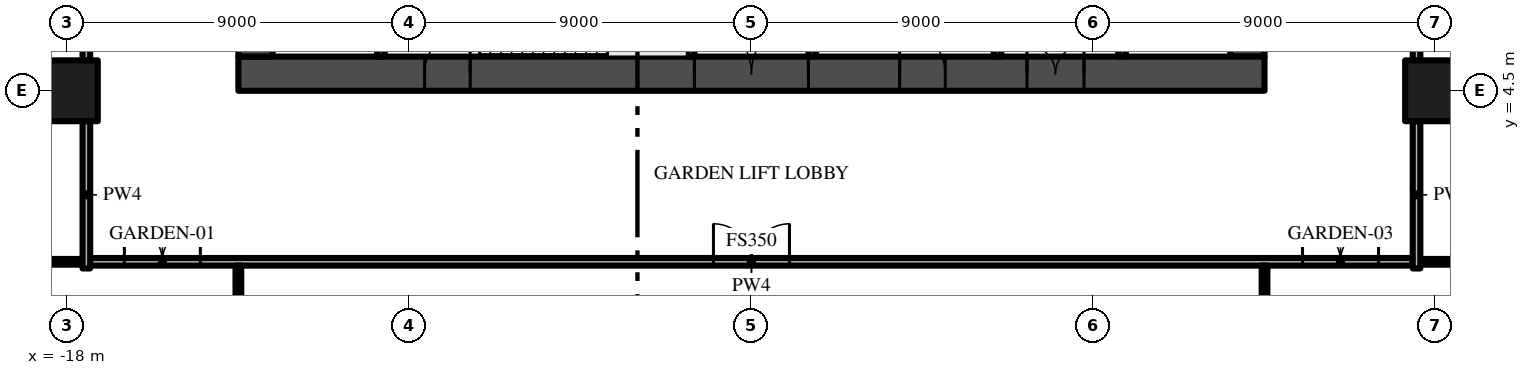
"""IFC4 building model, lengths in metres.
Left out: names, types, materials, properties, quantities, classifications, styles, units other than length and angle.
Written with IfcOpenShell. Run it as: python <this file> out.ifc"""

import sys

from ifc_helpers import new_model, si_unit, direction, frame, frame_2d, origin, origin_2d, place, context, subcontext, project, spatial, rectangle, extrude, element, fill, save


model = new_model("IFC4")
c1 = context("Model", 3, precision=1e-05, world=origin(), true_north=direction((0.0, 1.0)))
c2 = subcontext(c1, "Body", "Model", "MODEL_VIEW")
j1 = project(units=[si_unit("LENGTHUNIT", "METRE"), si_unit("PLANEANGLEUNIT", "RADIAN")], contexts=[c1])
p1 = place(None, origin())
s1 = spatial("IfcSite", under=j1, at=p1, CompositionType="ELEMENT")
p2 = place(p1, origin())
s2 = spatial("IfcBuilding", under=s1, at=p2, CompositionType="ELEMENT")
p3 = place(p2, frame((0.0, 0.0, 10.5)))
s3 = spatial("IfcBuildingStorey", under=s2, at=p3, CompositionType="ELEMENT", Elevation=10.5)
p4 = place(p3, frame((-13.5, 4.95, -0.35), z_axis=(0.0, 0.0, 1.0), x_axis=(1.0, 0.0, 0.0)))
e1 = element("IfcWall", 1, at=p4, inside=s3, PredefinedType="SHEAR", context=c2, shape_type="SweptSolid", body=[
    extrude(rectangle(XDim=27.0, YDim=0.9, at=frame_2d((13.5, 0.0))), origin(), (0.0, 0.0, 1.0), 4.55),
])
p5 = place(p4, frame((12.0, 0.0, 0.35)))
e2 = element("IfcOpeningElement", 2, at=p5, cuts=e1, PredefinedType="OPENING", context=c2, shape_type="SweptSolid", body=[
    extrude(rectangle(XDim=3.0, YDim=2.4, at=frame_2d((1.5, 1.2))), frame((0.0, 0.46, 0.0), z_axis=(0.0, -1.0, 0.0), x_axis=(1.0, 0.0, 0.0)), (0.0, 0.0, 1.0), 0.92),
])
p6 = place(p4, frame((4.9, 0.0, 0.35)))
e3 = element("IfcOpeningElement", 3, at=p6, cuts=e1, PredefinedType="OPENING", context=c2, shape_type="SweptSolid", body=[
    extrude(rectangle(XDim=1.2, YDim=2.2, at=frame_2d((0.6, 1.1))), frame((0.0, 0.46, 0.0), z_axis=(0.0, -1.0, 0.0), x_axis=(1.0, 0.0, 0.0)), (0.0, 0.0, 1.0), 0.92),
])
p7 = place(p4, frame((20.75, 0.0, 0.35)))
e4 = element("IfcOpeningElement", 4, at=p7, cuts=e1, PredefinedType="OPENING", context=c2, shape_type="SweptSolid", body=[
    extrude(rectangle(XDim=1.5, YDim=2.2, at=frame_2d((0.75, 1.1))), frame((0.0, 0.46, 0.0), z_axis=(0.0, -1.0, 0.0), x_axis=(1.0, 0.0, 0.0)), (0.0, 0.0, 1.0), 0.92),
])
p8 = place(p4, frame((17.4, 0.0, 0.35)))
e5 = element("IfcOpeningElement", 5, at=p8, cuts=e1, PredefinedType="OPENING", context=c2, shape_type="SweptSolid", body=[
    extrude(rectangle(XDim=1.2, YDim=2.2, at=frame_2d((0.6, 1.1))), frame((0.0, 0.46, 0.0), z_axis=(0.0, -1.0, 0.0), x_axis=(1.0, 0.0, 0.0)), (0.0, 0.0, 1.0), 0.92),
])
p9 = place(p3, frame((13.05, 5.4, -0.35), z_axis=(0.0, 0.0, 1.0), x_axis=(0.0, 1.0, 0.0)))
e6 = element("IfcWall", 6, at=p9, inside=s3, PredefinedType="SHEAR", context=c2, shape_type="SweptSolid", body=[
    extrude(rectangle(XDim=16.2, YDim=0.9, at=frame_2d((8.1, 0.0))), origin(), (0.0, 0.0, 1.0), 4.55),
])
p10 = place(p9, frame((6.0, 0.0, 0.35)))
e7 = element("IfcOpeningElement", 7, at=p10, cuts=e6, PredefinedType="OPENING", context=c2, shape_type="SweptSolid", body=[
    extrude(rectangle(XDim=1.2, YDim=2.2, at=frame_2d((0.6, 1.1))), frame((0.0, 0.46, 0.0), z_axis=(0.0, -1.0, 0.0), x_axis=(1.0, 0.0, 0.0)), (0.0, 0.0, 1.0), 0.92),
])
p11 = place(p3, frame((-13.05, 21.6, -0.35), z_axis=(0.0, 0.0, 1.0), x_axis=(0.0, -1.0, 0.0)))
e8 = element("IfcWall", 8, at=p11, inside=s3, PredefinedType="SHEAR", context=c2, shape_type="SweptSolid", body=[
    extrude(rectangle(XDim=16.2, YDim=0.9, at=frame_2d((8.1, 0.0))), origin(), (0.0, 0.0, 1.0), 4.55),
])
p12 = place(p11, frame((9.0, 0.0, 0.35)))
e9 = element("IfcOpeningElement", 9, at=p12, cuts=e8, PredefinedType="OPENING", context=c2, shape_type="SweptSolid", body=[
    extrude(rectangle(XDim=1.2, YDim=2.2, at=frame_2d((0.6, 1.1))), frame((0.0, 0.46, 0.0), z_axis=(0.0, -1.0, 0.0), x_axis=(1.0, 0.0, 0.0)), (0.0, 0.0, 1.0), 0.92),
])
for number, where, z_axis, x_axis in (
    (10, (-18.0, 4.5, 0.0), (0.0, 0.0, 1.0), (1.0, 0.0, 0.0)),
    (11, (18.0, 4.5, 0.0), (0.0, 0.0, 1.0), (1.0, 0.0, 0.0)),
):
    element("IfcColumn", number, at=place(p3, frame(where, z_axis=z_axis, x_axis=x_axis)), inside=s3, PredefinedType="COLUMN", context=c2, shape_type="SweptSolid", body=[
        extrude(rectangle(XDim=1.6, YDim=1.6, at=origin_2d()), origin(), (0.0, 0.0, 1.0), 4.2),
    ])
for number, where, z_axis, x_axis in (
    (12, (-9.75, 5.4, 0.0), (0.0, 0.0, 1.0), (0.0, 1.0, 0.0)),
    (13, (-1.6, 5.4, 0.0), (0.0, 0.0, 1.0), (0.0, 1.0, 0.0)),
):
    element("IfcWall", number, at=place(p3, frame(where, z_axis=z_axis, x_axis=x_axis)), inside=s3, PredefinedType="SHEAR", context=c2, shape_type="SweptSolid", body=[
        extrude(rectangle(XDim=2.55, YDim=0.2, at=frame_2d((1.275, 0.0))), origin(), (0.0, 0.0, 1.0), 4.2),
    ])
p13 = place(p3, frame((1.6, 9.2, 0.0), z_axis=(0.0, 0.0, 1.0), x_axis=(0.0, -1.0, 0.0)))
e14 = element("IfcWall", 14, at=p13, inside=s3, PredefinedType="SHEAR", context=c2, shape_type="SweptSolid", body=[
    extrude(rectangle(XDim=3.8, YDim=0.2, at=frame_2d((1.9, 0.0))), origin(), (0.0, 0.0, 1.0), 4.2),
])
p14 = place(p13, frame((1.05, 0.0, 0.0)))
e15 = element("IfcOpeningElement", 15, at=p14, cuts=e14, PredefinedType="OPENING", context=c2, shape_type="SweptSolid", body=[
    extrude(rectangle(XDim=0.9, YDim=2.1, at=frame_2d((0.45, 1.05))), frame((0.0, 0.11, 0.0), z_axis=(0.0, -1.0, 0.0), x_axis=(1.0, 0.0, 0.0)), (0.0, 0.0, 1.0), 0.22),
])
p15 = place(p3, frame((6.475, 5.4, 0.0), z_axis=(0.0, 0.0, 1.0), x_axis=(0.0, 1.0, 0.0)))
e16 = element("IfcWall", 16, at=p15, inside=s3, PredefinedType="SHEAR", context=c2, shape_type="SweptSolid", body=[
    extrude(rectangle(XDim=3.8, YDim=0.2, at=frame_2d((1.9, 0.0))), origin(), (0.0, 0.0, 1.0), 4.2),
])
p16 = place(p3, frame((9.75, 5.4, 0.0), z_axis=(0.0, 0.0, 1.0), x_axis=(0.0, 1.0, 0.0)))
e17 = element("IfcWall", 17, at=p16, inside=s3, PredefinedType="SHEAR", context=c2, shape_type="SweptSolid", body=[
    extrude(rectangle(XDim=2.2, YDim=0.2, at=frame_2d((1.1, 0.0))), origin(), (0.0, 0.0, 1.0), 4.2),
])
p17 = place(p16, frame((0.55, 0.0, 0.0)))
e18 = element("IfcOpeningElement", 18, at=p17, cuts=e17, PredefinedType="OPENING", context=c2, shape_type="SweptSolid", body=[
    extrude(rectangle(XDim=1.1, YDim=2.1, at=frame_2d((0.55, 1.05))), frame((0.0, 0.11, 0.0), z_axis=(0.0, -1.0, 0.0), x_axis=(1.0, 0.0, 0.0)), (0.0, 0.0, 1.0), 0.22),
])
p18 = place(p3, frame((-17.4, 0.0, 0.0), z_axis=(0.0, 0.0, 1.0), x_axis=(1.0, 0.0, 0.0)))
e19 = element("IfcWall", 19, at=p18, inside=s3, PredefinedType="PARTITIONING", context=c2, shape_type="SweptSolid", body=[
    extrude(rectangle(XDim=34.8, YDim=0.2, at=frame_2d((17.4, 0.0))), origin(), (0.0, 0.0, 1.0), 4.2),
])
p19 = place(p18, frame((0.9, 0.0, 0.0)))
e20 = element("IfcOpeningElement", 20, at=p19, cuts=e19, PredefinedType="OPENING", context=c2, shape_type="SweptSolid", body=[
    extrude(rectangle(XDim=2.0, YDim=2.4, at=frame_2d((1.0, 1.2))), frame((0.0, 0.11, 0.0), z_axis=(0.0, -1.0, 0.0), x_axis=(1.0, 0.0, 0.0)), (0.0, 0.0, 1.0), 0.22),
])
p20 = place(p18, frame((16.4, 0.0, 0.0)))
e21 = element("IfcOpeningElement", 21, at=p20, cuts=e19, PredefinedType="OPENING", context=c2, shape_type="SweptSolid", body=[
    extrude(rectangle(XDim=2.0, YDim=2.4, at=frame_2d((1.0, 1.2))), frame((0.0, 0.11, 0.0), z_axis=(0.0, -1.0, 0.0), x_axis=(1.0, 0.0, 0.0)), (0.0, 0.0, 1.0), 0.22),
])
p21 = place(p18, frame((31.9, 0.0, 0.0)))
e22 = element("IfcOpeningElement", 22, at=p21, cuts=e19, PredefinedType="OPENING", context=c2, shape_type="SweptSolid", body=[
    extrude(rectangle(XDim=2.0, YDim=2.4, at=frame_2d((1.0, 1.2))), frame((0.0, 0.11, 0.0), z_axis=(0.0, -1.0, 0.0), x_axis=(1.0, 0.0, 0.0)), (0.0, 0.0, 1.0), 0.22),
])
for number, where, z_axis, x_axis in (
    (23, (-26.7, 0.0, 0.0), (0.0, 0.0, 1.0), (1.0, 0.0, 0.0)),
    (24, (17.6, 0.0, 0.0), (0.0, 0.0, 1.0), (1.0, 0.0, 0.0)),
):
    element("IfcWall", number, at=place(p3, frame(where, z_axis=z_axis, x_axis=x_axis)), inside=s3, PredefinedType="PARTITIONING", context=c2, shape_type="SweptSolid", body=[
        extrude(rectangle(XDim=9.1, YDim=0.15, at=frame_2d((4.55, 0.0))), origin(), (0.0, 0.0, 1.0), 4.2),
    ])
p22 = place(p3, frame((-17.5, -0.175, 0.0), z_axis=(0.0, 0.0, 1.0), x_axis=(0.0, 1.0, 0.0)))
e25 = element("IfcWall", 25, at=p22, inside=s3, PredefinedType="PARTITIONING", context=c2, shape_type="SweptSolid", body=[
    extrude(rectangle(XDim=3.875, YDim=0.2, at=frame_2d((1.938, 0.0))), origin(), (0.0, 0.0, 1.0), 4.2),
])
p23 = place(p3, frame((-17.5, 12.7, 0.0), z_axis=(0.0, 0.0, 1.0), x_axis=(0.0, -1.0, 0.0)))
e26 = element("IfcWall", 26, at=p23, inside=s3, PredefinedType="PARTITIONING", context=c2, shape_type="SweptSolid", body=[
    extrude(rectangle(XDim=7.4, YDim=0.2, at=frame_2d((3.7, 0.0))), origin(), (0.0, 0.0, 1.0), 4.2),
])
p24 = place(p23, frame((2.8, 0.0, 0.0)))
e27 = element("IfcOpeningElement", 27, at=p24, cuts=e26, PredefinedType="OPENING", context=c2, shape_type="SweptSolid", body=[
    extrude(rectangle(XDim=1.8, YDim=2.4, at=frame_2d((0.9, 1.2))), frame((0.0, 0.11, 0.0), z_axis=(0.0, -1.0, 0.0), x_axis=(1.0, 0.0, 0.0)), (0.0, 0.0, 1.0), 0.22),
])
for number, where, z_axis, x_axis in (
    (28, (-13.5, -22.2, 0.0), (0.0, 0.0, 1.0), (0.0, 1.0, 0.0)),
    (29, (13.5, -22.2, 0.0), (0.0, 0.0, 1.0), (0.0, 1.0, 0.0)),
):
    element("IfcWall", number, at=place(p3, frame(where, z_axis=z_axis, x_axis=x_axis)), inside=s3, PredefinedType="PARTITIONING", context=c2, shape_type="SweptSolid", body=[
        extrude(rectangle(XDim=22.1, YDim=0.15, at=frame_2d((11.05, 0.0))), origin(), (0.0, 0.0, 1.0), 4.2),
    ])
p25 = place(p3, frame((17.5, -0.175, 0.0), z_axis=(0.0, 0.0, 1.0), x_axis=(0.0, 1.0, 0.0)))
e30 = element("IfcWall", 30, at=p25, inside=s3, PredefinedType="PARTITIONING", context=c2, shape_type="SweptSolid", body=[
    extrude(rectangle(XDim=3.875, YDim=0.2, at=frame_2d((1.938, 0.0))), origin(), (0.0, 0.0, 1.0), 4.2),
])
p26 = place(p3, frame((17.5, 5.3, 0.0), z_axis=(0.0, 0.0, 1.0), x_axis=(0.0, 1.0, 0.0)))
e31 = element("IfcWall", 31, at=p26, inside=s3, PredefinedType="PARTITIONING", context=c2, shape_type="SweptSolid", body=[
    extrude(rectangle(XDim=7.4, YDim=0.2, at=frame_2d((3.7, 0.0))), origin(), (0.0, 0.0, 1.0), 4.2),
])
p27 = place(p26, frame((2.8, 0.0, 0.0)))
e32 = element("IfcOpeningElement", 32, at=p27, cuts=e31, PredefinedType="OPENING", context=c2, shape_type="SweptSolid", body=[
    extrude(rectangle(XDim=1.8, YDim=2.4, at=frame_2d((0.9, 1.2))), frame((0.0, 0.11, 0.0), z_axis=(0.0, -1.0, 0.0), x_axis=(1.0, 0.0, 0.0)), (0.0, 0.0, 1.0), 0.22),
])
p28 = place(p5, frame((3.0, 0.0, 0.0), z_axis=(0.0, 0.0, 1.0), x_axis=(-1.0, 0.0, 0.0)))
e33 = element("IfcDoor", 33, at=p28, inside=s3, OperationType="DOUBLE_DOOR_SINGLE_SWING", PredefinedType="DOOR", context=c2, shape_type="SweptSolid", body=[
    extrude(rectangle(XDim=3.0, YDim=2.4, at=frame_2d((1.5, 1.2))), frame((0.0, 0.025, 0.0), z_axis=(0.0, -1.0, 0.0), x_axis=(1.0, 0.0, 0.0)), (0.0, 0.0, 1.0), 0.05),
])
fill(e2, e33)
p29 = place(p6, frame((1.2, 0.0, 0.0), z_axis=(0.0, 0.0, 1.0), x_axis=(-1.0, 0.0, 0.0)))
e34 = element("IfcDoor", 34, at=p29, inside=s3, OperationType="SINGLE_SWING_LEFT", PredefinedType="DOOR", context=c2, shape_type="SweptSolid", body=[
    extrude(rectangle(XDim=1.2, YDim=2.2, at=frame_2d((0.6, 1.1))), frame((0.0, 0.025, 0.0), z_axis=(0.0, -1.0, 0.0), x_axis=(1.0, 0.0, 0.0)), (0.0, 0.0, 1.0), 0.05),
])
fill(e3, e34)
p30 = place(p7, frame((1.5, 0.0, 0.0), z_axis=(0.0, 0.0, 1.0), x_axis=(-1.0, 0.0, 0.0)))
e35 = element("IfcDoor", 35, at=p30, inside=s3, OperationType="DOUBLE_DOOR_SINGLE_SWING", PredefinedType="DOOR", context=c2, shape_type="SweptSolid", body=[
    extrude(rectangle(XDim=1.5, YDim=2.2, at=frame_2d((0.75, 1.1))), frame((0.0, 0.025, 0.0), z_axis=(0.0, -1.0, 0.0), x_axis=(1.0, 0.0, 0.0)), (0.0, 0.0, 1.0), 0.05),
])
fill(e4, e35)
p31 = place(p8, frame((1.2, 0.0, 0.0), z_axis=(0.0, 0.0, 1.0), x_axis=(-1.0, 0.0, 0.0)))
e36 = element("IfcDoor", 36, at=p31, inside=s3, OperationType="SINGLE_SWING_RIGHT", PredefinedType="DOOR", context=c2, shape_type="SweptSolid", body=[
    extrude(rectangle(XDim=1.2, YDim=2.2, at=frame_2d((0.6, 1.1))), frame((0.0, 0.025, 0.0), z_axis=(0.0, -1.0, 0.0), x_axis=(1.0, 0.0, 0.0)), (0.0, 0.0, 1.0), 0.05),
])
fill(e5, e36)
p32 = place(p19, origin())
e37 = element("IfcDoor", 37, at=p32, inside=s3, OperationType="DOUBLE_DOOR_SINGLE_SWING", PredefinedType="DOOR", context=c2, shape_type="SweptSolid", body=[
    extrude(rectangle(XDim=2.0, YDim=2.4, at=frame_2d((1.0, 1.2))), frame((0.0, 0.025, 0.0), z_axis=(0.0, -1.0, 0.0), x_axis=(1.0, 0.0, 0.0)), (0.0, 0.0, 1.0), 0.05),
])
fill(e20, e37)
p33 = place(p20, origin())
e38 = element("IfcDoor", 38, at=p33, inside=s3, OperationType="DOUBLE_DOOR_SINGLE_SWING", PredefinedType="DOOR", context=c2, shape_type="SweptSolid", body=[
    extrude(rectangle(XDim=2.0, YDim=2.4, at=frame_2d((1.0, 1.2))), frame((0.0, 0.025, 0.0), z_axis=(0.0, -1.0, 0.0), x_axis=(1.0, 0.0, 0.0)), (0.0, 0.0, 1.0), 0.05),
])
fill(e21, e38)
p34 = place(p21, origin())
e39 = element("IfcDoor", 39, at=p34, inside=s3, OperationType="DOUBLE_DOOR_SINGLE_SWING", PredefinedType="DOOR", context=c2, shape_type="SweptSolid", body=[
    extrude(rectangle(XDim=2.0, YDim=2.4, at=frame_2d((1.0, 1.2))), frame((0.0, 0.025, 0.0), z_axis=(0.0, -1.0, 0.0), x_axis=(1.0, 0.0, 0.0)), (0.0, 0.0, 1.0), 0.05),
])
fill(e22, e39)
save(model, sys.argv[1])
